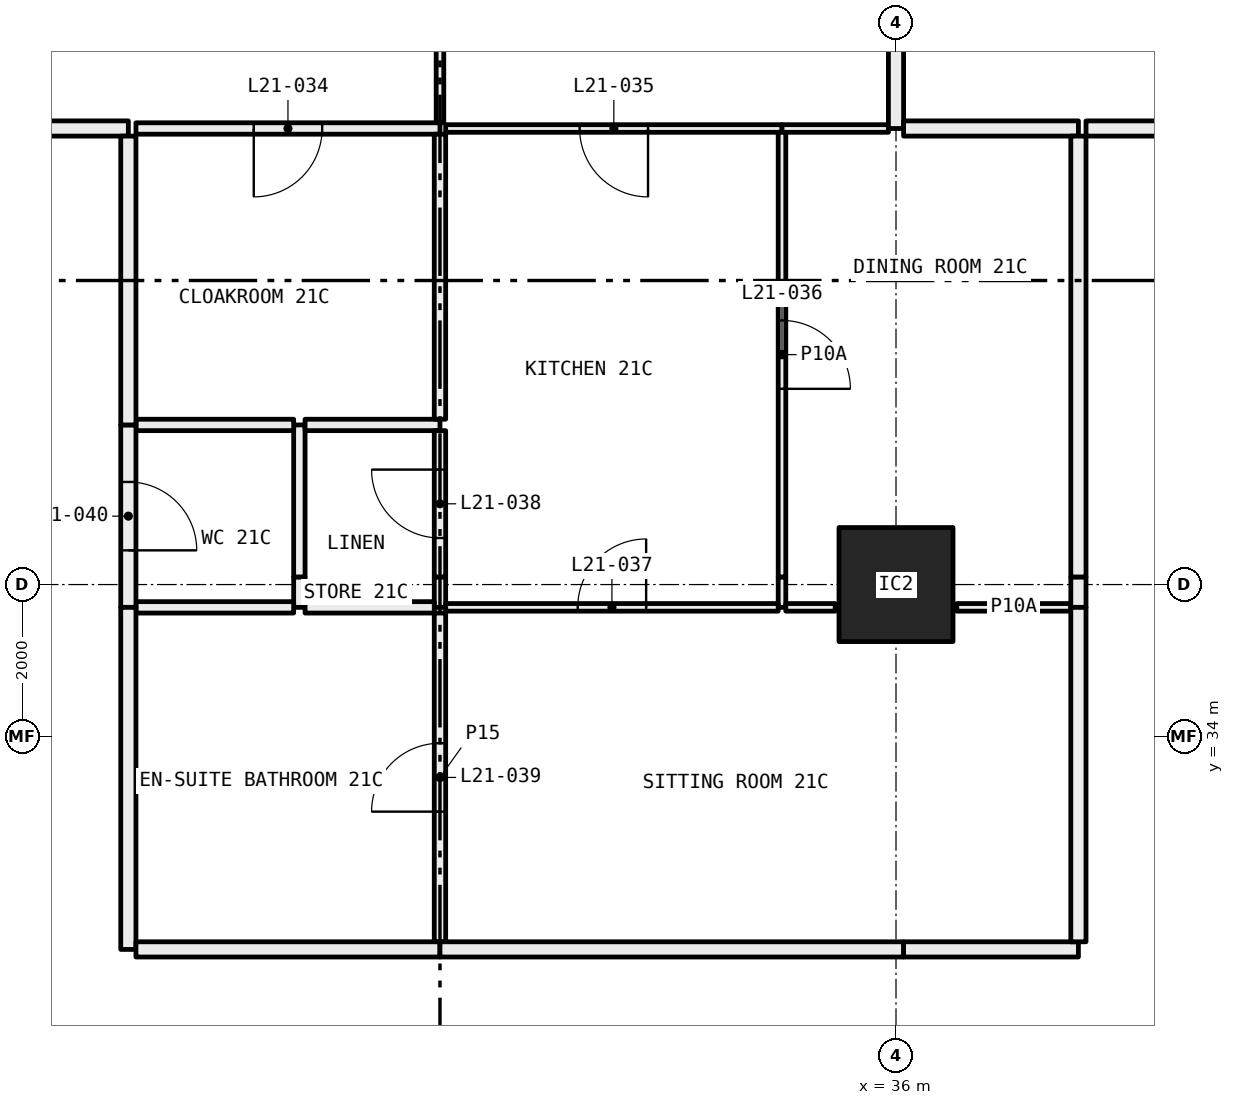
"""IFC4 building model, lengths in metres.
Left out: names, types, materials, properties, quantities, classifications, styles, units other than length and angle.
Written with IfcOpenShell. Run it as: python <this file> out.ifc"""

import sys

from ifc_helpers import new_model, si_unit, direction, frame, frame_2d, origin, origin_2d, place, context, subcontext, project, spatial, rectangle, hollow_rectangle, extrude, element, fill, save


model = new_model("IFC4")
c1 = context("Model", 3, precision=1e-05, world=origin(), true_north=direction((0.0, 1.0)))
c2 = subcontext(c1, "Body", "Model", "MODEL_VIEW")
j1 = project(units=[si_unit("LENGTHUNIT", "METRE"), si_unit("PLANEANGLEUNIT", "RADIAN")], contexts=[c1])
p1 = place(None, origin())
s1 = spatial("IfcSite", under=j1, at=p1, CompositionType="ELEMENT")
p2 = place(p1, origin())
s2 = spatial("IfcBuilding", under=s1, at=p2, CompositionType="ELEMENT")
p3 = place(p2, frame((0.0, 0.0, 85.2)))
s3 = spatial("IfcBuildingStorey", under=s2, at=p3, CompositionType="ELEMENT", Elevation=85.2)
p4 = place(p3, frame((36.0, 36.0, 0.0), z_axis=(0.0, 0.0, 1.0), x_axis=(1.0, 0.0, 0.0)))
e1 = element("IfcColumn", 1, at=p4, inside=s3, PredefinedType="COLUMN", context=c2, shape_type="SweptSolid", body=[
    extrude(hollow_rectangle(XDim=1.5, YDim=1.5, WallThickness=0.065, at=origin_2d()), origin(), (0.0, 0.0, 1.0), 3.05),
])
p5 = place(p3, frame((30.0, 42.075, 0.0), z_axis=(0.0, 0.0, 1.0), x_axis=(0.0, 1.0, 0.0)))
e2 = element("IfcWall", 2, at=p5, inside=s3, PredefinedType="PARTITIONING", context=c2, shape_type="SweptSolid", body=[
    extrude(rectangle(XDim=5.205, YDim=0.1, at=frame_2d((2.603, 0.0))), origin(), (0.0, 0.0, 1.0), 3.05),
])
p6 = place(p5, frame((2.153, 0.0, 0.0)))
e3 = element("IfcOpeningElement", 3, at=p6, cuts=e2, PredefinedType="OPENING", context=c2, shape_type="SweptSolid", body=[
    extrude(rectangle(XDim=0.9, YDim=2.1, at=frame_2d((0.45, 1.05))), frame((0.0, 0.06, 0.0), z_axis=(0.0, -1.0, 0.0), x_axis=(1.0, 0.0, 0.0)), (0.0, 0.0, 1.0), 0.12),
])
p7 = place(p3, frame((26.0, 42.0, 0.0), z_axis=(0.0, 0.0, 1.0), x_axis=(1.0, 0.0, 0.0)))
e4 = element("IfcWall", 4, at=p7, inside=s3, PredefinedType="PARTITIONING", context=c2, shape_type="SweptSolid", body=[
    extrude(rectangle(XDim=4.0, YDim=0.15, at=frame_2d((2.0, 0.0))), origin(), (0.0, 0.0, 1.0), 3.05),
])
p8 = place(p7, frame((1.55, 0.0, 0.0)))
e5 = element("IfcOpeningElement", 5, at=p8, cuts=e4, PredefinedType="OPENING", context=c2, shape_type="SweptSolid", body=[
    extrude(rectangle(XDim=0.9, YDim=2.1, at=frame_2d((0.45, 1.05))), frame((0.0, 0.085, 0.0), z_axis=(0.0, -1.0, 0.0), x_axis=(1.0, 0.0, 0.0)), (0.0, 0.0, 1.0), 0.17),
])
p9 = place(p3, frame((24.0, 42.0, 0.0), z_axis=(0.0, 0.0, 1.0), x_axis=(1.0, 0.0, 0.0)))
e6 = element("IfcWall", 6, at=p9, inside=s3, PredefinedType="PARTITIONING", context=c2, shape_type="SweptSolid", body=[
    extrude(rectangle(XDim=1.9, YDim=0.2, at=frame_2d((0.95, 0.0))), origin(), (0.0, 0.0, 1.0), 3.05),
])
p10 = place(p3, frame((30.075, 42.0, 0.0), z_axis=(0.0, 0.0, 1.0), x_axis=(1.0, 0.0, 0.0)))
e7 = element("IfcWall", 7, at=p10, inside=s3, PredefinedType="PARTITIONING", context=c2, shape_type="SweptSolid", body=[
    extrude(rectangle(XDim=4.425, YDim=0.1, at=frame_2d((2.212, 0.0))), origin(), (0.0, 0.0, 1.0), 3.05),
])
p11 = place(p10, frame((1.762, 0.0, 0.0)))
e8 = element("IfcOpeningElement", 8, at=p11, cuts=e7, PredefinedType="OPENING", context=c2, shape_type="SweptSolid", body=[
    extrude(rectangle(XDim=0.9, YDim=2.1, at=frame_2d((0.45, 1.05))), frame((0.0, 0.06, 0.0), z_axis=(0.0, -1.0, 0.0), x_axis=(1.0, 0.0, 0.0)), (0.0, 0.0, 1.0), 0.12),
])
p12 = place(p3, frame((34.5, 42.0, 0.0), z_axis=(0.0, 0.0, 1.0), x_axis=(1.0, 0.0, 0.0)))
e9 = element("IfcWall", 9, at=p12, inside=s3, PredefinedType="PARTITIONING", context=c2, shape_type="SweptSolid", body=[
    extrude(rectangle(XDim=1.4, YDim=0.1, at=frame_2d((0.7, 0.0))), origin(), (0.0, 0.0, 1.0), 3.05),
])
p13 = place(p3, frame((36.0, 42.0, 0.0), z_axis=(0.0, 0.0, 1.0), x_axis=(0.0, 1.0, 0.0)))
e10 = element("IfcWall", 10, at=p13, inside=s3, PredefinedType="PARTITIONING", context=c2, shape_type="SweptSolid", body=[
    extrude(rectangle(XDim=3.0, YDim=0.2, at=frame_2d((1.5, 0.0))), origin(), (0.0, 0.0, 1.0), 2.45),
])
p14 = place(p3, frame((28.15, 35.7, 0.0), z_axis=(0.0, 0.0, 1.0), x_axis=(0.0, 1.0, 0.0)))
e11 = element("IfcWall", 11, at=p14, inside=s3, PredefinedType="PARTITIONING", context=c2, shape_type="SweptSolid", body=[
    extrude(rectangle(XDim=0.4, YDim=0.15, at=frame_2d((0.2, 0.0))), origin(), (0.0, 0.0, 1.0), 2.45),
])
p15 = place(p3, frame((28.15, 36.1, 0.0), z_axis=(0.0, 0.0, 1.0), x_axis=(0.0, 1.0, 0.0)))
e12 = element("IfcWall", 12, at=p15, inside=s3, PredefinedType="PARTITIONING", context=c2, shape_type="SweptSolid", body=[
    extrude(rectangle(XDim=2.0, YDim=0.15, at=frame_2d((1.0, 0.0))), origin(), (0.0, 0.0, 1.0), 3.05),
])
for number, where, z_axis, x_axis in (
    (13, (28.075, 38.1, 0.0), (0.0, 0.0, 1.0), (-1.0, 0.0, 0.0)),
    (14, (26.0, 35.7, 0.0), (0.0, 0.0, 1.0), (1.0, 0.0, 0.0)),
):
    element("IfcWall", number, at=place(p3, frame(where, z_axis=z_axis, x_axis=x_axis)), inside=s3, PredefinedType="PARTITIONING", context=c2, shape_type="SweptSolid", body=[
        extrude(rectangle(XDim=2.075, YDim=0.15, at=frame_2d((1.038, 0.0))), origin(), (0.0, 0.0, 1.0), 3.05),
    ])
p16 = place(p3, frame((25.9, 38.1, 0.0), z_axis=(0.0, 0.0, 1.0), x_axis=(0.0, -1.0, 0.0)))
e15 = element("IfcWall", 15, at=p16, inside=s3, PredefinedType="PARTITIONING", context=c2, shape_type="SweptSolid", body=[
    extrude(rectangle(XDim=2.4, YDim=0.2, at=frame_2d((1.2, 0.0))), origin(), (0.0, 0.0, 1.0), 2.45),
])
p17 = place(p16, frame((0.75, 0.0, 0.0)))
e16 = element("IfcOpeningElement", 16, at=p17, cuts=e15, PredefinedType="OPENING", context=c2, shape_type="SweptSolid", body=[
    extrude(rectangle(XDim=0.9, YDim=2.1, at=frame_2d((0.45, 1.05))), frame((0.0, 0.11, 0.0), z_axis=(0.0, -1.0, 0.0), x_axis=(1.0, 0.0, 0.0)), (0.0, 0.0, 1.0), 0.22),
])
p18 = place(p3, frame((30.0, 38.1, 0.0), z_axis=(0.0, 0.0, 1.0), x_axis=(-1.0, 0.0, 0.0)))
e17 = element("IfcWall", 17, at=p18, inside=s3, PredefinedType="PARTITIONING", context=c2, shape_type="SweptSolid", body=[
    extrude(rectangle(XDim=1.775, YDim=0.15, at=frame_2d((0.887, 0.0))), origin(), (0.0, 0.0, 1.0), 3.05),
])
p19 = place(p3, frame((30.0, 35.7, 0.0), z_axis=(0.0, 0.0, 1.0), x_axis=(0.0, 1.0, 0.0)))
e18 = element("IfcWall", 18, at=p19, inside=s3, PredefinedType="PARTITIONING", context=c2, shape_type="SweptSolid", body=[
    extrude(rectangle(XDim=0.4, YDim=0.15, at=frame_2d((0.2, 0.0))), origin(), (0.0, 0.0, 1.0), 2.45),
])
p20 = place(p3, frame((30.0, 36.1, 0.0), z_axis=(0.0, 0.0, 1.0), x_axis=(0.0, 1.0, 0.0)))
e19 = element("IfcWall", 19, at=p20, inside=s3, PredefinedType="PARTITIONING", context=c2, shape_type="SweptSolid", body=[
    extrude(rectangle(XDim=1.925, YDim=0.15, at=frame_2d((0.962, 0.0))), origin(), (0.0, 0.0, 1.0), 3.05),
])
p21 = place(p20, frame((0.512, 0.0, 0.0)))
e20 = element("IfcOpeningElement", 20, at=p21, cuts=e19, PredefinedType="OPENING", context=c2, shape_type="SweptSolid", body=[
    extrude(rectangle(XDim=0.9, YDim=2.1, at=frame_2d((0.45, 1.05))), frame((0.0, 0.085, 0.0), z_axis=(0.0, -1.0, 0.0), x_axis=(1.0, 0.0, 0.0)), (0.0, 0.0, 1.0), 0.17),
])
p22 = place(p3, frame((28.225, 35.7, 0.0), z_axis=(0.0, 0.0, 1.0), x_axis=(1.0, 0.0, 0.0)))
e21 = element("IfcWall", 21, at=p22, inside=s3, PredefinedType="PARTITIONING", context=c2, shape_type="SweptSolid", body=[
    extrude(rectangle(XDim=1.7, YDim=0.15, at=frame_2d((0.85, 0.0))), origin(), (0.0, 0.0, 1.0), 3.05),
])
p23 = place(p3, frame((30.0, 38.175, 0.0), z_axis=(0.0, 0.0, 1.0), x_axis=(0.0, 1.0, 0.0)))
e22 = element("IfcWall", 22, at=p23, inside=s3, PredefinedType="PARTITIONING", context=c2, shape_type="SweptSolid", body=[
    extrude(rectangle(XDim=3.75, YDim=0.15, at=frame_2d((1.875, 0.0))), origin(), (0.0, 0.0, 1.0), 3.05),
])
p24 = place(p3, frame((25.9, 41.9, 0.0), z_axis=(0.0, 0.0, 1.0), x_axis=(0.0, -1.0, 0.0)))
e23 = element("IfcWall", 23, at=p24, inside=s3, PredefinedType="PARTITIONING", context=c2, shape_type="SweptSolid", body=[
    extrude(rectangle(XDim=3.8, YDim=0.2, at=frame_2d((1.9, 0.0))), origin(), (0.0, 0.0, 1.0), 3.05),
])
p25 = place(p3, frame((34.5, 35.7, 0.0), z_axis=(0.0, 0.0, 1.0), x_axis=(0.0, 1.0, 0.0)))
e24 = element("IfcWall", 24, at=p25, inside=s3, PredefinedType="PARTITIONING", context=c2, shape_type="SweptSolid", body=[
    extrude(rectangle(XDim=0.4, YDim=0.1, at=frame_2d((0.2, 0.0))), origin(), (0.0, 0.0, 1.0), 2.45),
])
p26 = place(p3, frame((34.5, 36.1, 0.0), z_axis=(0.0, 0.0, 1.0), x_axis=(0.0, 1.0, 0.0)))
e25 = element("IfcWall", 25, at=p26, inside=s3, PredefinedType="PARTITIONING", context=c2, shape_type="SweptSolid", body=[
    extrude(rectangle(XDim=5.85, YDim=0.1, at=frame_2d((2.925, 0.0))), origin(), (0.0, 0.0, 1.0), 3.05),
])
p27 = place(p26, frame((2.475, 0.0, 0.0)))
e26 = element("IfcOpeningElement", 26, at=p27, cuts=e25, PredefinedType="OPENING", context=c2, shape_type="SweptSolid", body=[
    extrude(rectangle(XDim=0.9, YDim=2.1, at=frame_2d((0.45, 1.05))), frame((0.0, 0.06, 0.0), z_axis=(0.0, -1.0, 0.0), x_axis=(1.0, 0.0, 0.0)), (0.0, 0.0, 1.0), 0.12),
])
p28 = place(p3, frame((30.075, 35.7, 0.0), z_axis=(0.0, 0.0, 1.0), x_axis=(1.0, 0.0, 0.0)))
e27 = element("IfcWall", 27, at=p28, inside=s3, PredefinedType="PARTITIONING", context=c2, shape_type="SweptSolid", body=[
    extrude(rectangle(XDim=4.375, YDim=0.1, at=frame_2d((2.188, 0.0))), origin(), (0.0, 0.0, 1.0), 3.05),
])
p29 = place(p28, frame((1.738, 0.0, 0.0)))
e28 = element("IfcOpeningElement", 28, at=p29, cuts=e27, PredefinedType="OPENING", context=c2, shape_type="SweptSolid", body=[
    extrude(rectangle(XDim=0.9, YDim=2.1, at=frame_2d((0.45, 1.05))), frame((0.0, 0.06, 0.0), z_axis=(0.0, -1.0, 0.0), x_axis=(1.0, 0.0, 0.0)), (0.0, 0.0, 1.0), 0.12),
])
p30 = place(p3, frame((34.55, 35.7, 0.0), z_axis=(0.0, 0.0, 1.0), x_axis=(1.0, 0.0, 0.0)))
e29 = element("IfcWall", 29, at=p30, inside=s3, PredefinedType="PARTITIONING", context=c2, shape_type="SweptSolid", body=[
    extrude(rectangle(XDim=0.65, YDim=0.1, at=frame_2d((0.325, 0.0))), origin(), (0.0, 0.0, 1.0), 3.05),
])
p31 = place(p3, frame((36.8, 35.7, 0.0), z_axis=(0.0, 0.0, 1.0), x_axis=(1.0, 0.0, 0.0)))
e30 = element("IfcWall", 30, at=p31, inside=s3, PredefinedType="PARTITIONING", context=c2, shape_type="SweptSolid", body=[
    extrude(rectangle(XDim=1.5, YDim=0.1, at=frame_2d((0.75, 0.0))), origin(), (0.0, 0.0, 1.0), 3.05),
])
p32 = place(p3, frame((38.4, 42.0, 0.0), z_axis=(0.0, 0.0, 1.0), x_axis=(-1.0, 0.0, 0.0)))
e31 = element("IfcWall", 31, at=p32, inside=s3, PredefinedType="PARTITIONING", context=c2, shape_type="SweptSolid", body=[
    extrude(rectangle(XDim=2.3, YDim=0.2, at=frame_2d((1.15, 0.0))), origin(), (0.0, 0.0, 1.0), 3.05),
])
p33 = place(p3, frame((38.4, 35.7, 0.0), z_axis=(0.0, 0.0, 1.0), x_axis=(0.0, 1.0, 0.0)))
e32 = element("IfcWall", 32, at=p33, inside=s3, PredefinedType="PARTITIONING", context=c2, shape_type="SweptSolid", body=[
    extrude(rectangle(XDim=0.4, YDim=0.2, at=frame_2d((0.2, 0.0))), origin(), (0.0, 0.0, 1.0), 2.45),
])
p34 = place(p3, frame((38.4, 36.1, 0.0), z_axis=(0.0, 0.0, 1.0), x_axis=(0.0, 1.0, 0.0)))
e33 = element("IfcWall", 33, at=p34, inside=s3, PredefinedType="PARTITIONING", context=c2, shape_type="SweptSolid", body=[
    extrude(rectangle(XDim=5.8, YDim=0.2, at=frame_2d((2.9, 0.0))), origin(), (0.0, 0.0, 1.0), 3.05),
])
p35 = place(p3, frame((30.0, 31.3, 0.0), z_axis=(0.0, 0.0, 1.0), x_axis=(0.0, 1.0, 0.0)))
e34 = element("IfcWall", 34, at=p35, inside=s3, PredefinedType="PARTITIONING", context=c2, shape_type="SweptSolid", body=[
    extrude(rectangle(XDim=4.325, YDim=0.15, at=frame_2d((2.163, 0.0))), origin(), (0.0, 0.0, 1.0), 3.05),
])
p36 = place(p35, frame((1.712, 0.0, 0.0)))
e35 = element("IfcOpeningElement", 35, at=p36, cuts=e34, PredefinedType="OPENING", context=c2, shape_type="SweptSolid", body=[
    extrude(rectangle(XDim=0.9, YDim=2.1, at=frame_2d((0.45, 1.05))), frame((0.0, 0.085, 0.0), z_axis=(0.0, -1.0, 0.0), x_axis=(1.0, 0.0, 0.0)), (0.0, 0.0, 1.0), 0.17),
])
p37 = place(p3, frame((25.9, 35.7, 0.0), z_axis=(0.0, 0.0, 1.0), x_axis=(0.0, -1.0, 0.0)))
e36 = element("IfcWall", 36, at=p37, inside=s3, PredefinedType="PARTITIONING", context=c2, shape_type="SweptSolid", body=[
    extrude(rectangle(XDim=4.5, YDim=0.2, at=frame_2d((2.25, 0.0))), origin(), (0.0, 0.0, 1.0), 3.05),
])
p38 = place(p3, frame((26.0, 31.2, 0.0), z_axis=(0.0, 0.0, 1.0), x_axis=(1.0, 0.0, 0.0)))
e37 = element("IfcWall", 37, at=p38, inside=s3, PredefinedType="PARTITIONING", context=c2, shape_type="SweptSolid", body=[
    extrude(rectangle(XDim=4.0, YDim=0.2, at=frame_2d((2.0, 0.0))), origin(), (0.0, 0.0, 1.0), 3.05),
])
p39 = place(p3, frame((30.0, 31.2, 0.0), z_axis=(0.0, 0.0, 1.0), x_axis=(1.0, 0.0, 0.0)))
e38 = element("IfcWall", 38, at=p39, inside=s3, PredefinedType="PARTITIONING", context=c2, shape_type="SweptSolid", body=[
    extrude(rectangle(XDim=6.1, YDim=0.2, at=frame_2d((3.05, 0.0))), origin(), (0.0, 0.0, 1.0), 2.45),
])
p40 = place(p3, frame((36.1, 31.2, 0.0), z_axis=(0.0, 0.0, 1.0), x_axis=(1.0, 0.0, 0.0)))
e39 = element("IfcWall", 39, at=p40, inside=s3, PredefinedType="PARTITIONING", context=c2, shape_type="SweptSolid", body=[
    extrude(rectangle(XDim=2.3, YDim=0.2, at=frame_2d((1.15, 0.0))), origin(), (0.0, 0.0, 1.0), 3.05),
])
p41 = place(p3, frame((38.4, 31.3, 0.0), z_axis=(0.0, 0.0, 1.0), x_axis=(0.0, 1.0, 0.0)))
e40 = element("IfcWall", 40, at=p41, inside=s3, PredefinedType="PARTITIONING", context=c2, shape_type="SweptSolid", body=[
    extrude(rectangle(XDim=4.4, YDim=0.2, at=frame_2d((2.2, 0.0))), origin(), (0.0, 0.0, 1.0), 3.05),
])
p42 = place(p3, frame((38.5, 42.0, 0.0), z_axis=(0.0, 0.0, 1.0), x_axis=(1.0, 0.0, 0.0)))
e41 = element("IfcWall", 41, at=p42, inside=s3, PredefinedType="PARTITIONING", context=c2, shape_type="SweptSolid", body=[
    extrude(rectangle(XDim=2.3, YDim=0.2, at=frame_2d((1.15, 0.0))), origin(), (0.0, 0.0, 1.0), 3.05),
])
p43 = place(p8, frame((0.9, 0.0, 0.0), x_axis=(-1.0, 0.0, 0.0)))
e42 = element("IfcDoor", 42, at=p43, inside=s3, OperationType="SINGLE_SWING_LEFT", PredefinedType="DOOR", context=c2, shape_type="SweptSolid", body=[
    extrude(rectangle(XDim=0.9, YDim=2.1, at=frame_2d((0.45, 1.05))), frame((0.0, 0.025, 0.0), z_axis=(0.0, -1.0, 0.0), x_axis=(1.0, 0.0, 0.0)), (0.0, 0.0, 1.0), 0.05),
])
fill(e5, e42)
p44 = place(p11, frame((0.9, 0.0, 0.0), x_axis=(-1.0, 0.0, 0.0)))
e43 = element("IfcDoor", 43, at=p44, inside=s3, OperationType="SINGLE_SWING_RIGHT", PredefinedType="DOOR", context=c2, shape_type="SweptSolid", body=[
    extrude(rectangle(XDim=0.9, YDim=2.1, at=frame_2d((0.45, 1.05))), frame((0.0, 0.025, 0.0), z_axis=(0.0, -1.0, 0.0), x_axis=(1.0, 0.0, 0.0)), (0.0, 0.0, 1.0), 0.05),
])
fill(e8, e43)
p45 = place(p27, frame((0.9, 0.0, 0.0), x_axis=(-1.0, 0.0, 0.0)))
e44 = element("IfcDoor", 44, at=p45, inside=s3, OperationType="SINGLE_SWING_LEFT", PredefinedType="DOOR", context=c2, shape_type="SweptSolid", body=[
    extrude(rectangle(XDim=0.9, YDim=2.1, at=frame_2d((0.45, 1.05))), frame((0.0, 0.025, 0.0), z_axis=(0.0, -1.0, 0.0), x_axis=(1.0, 0.0, 0.0)), (0.0, 0.0, 1.0), 0.05),
])
fill(e26, e44)
p46 = place(p29, origin())
e45 = element("IfcDoor", 45, at=p46, inside=s3, OperationType="SINGLE_SWING_LEFT", PredefinedType="DOOR", context=c2, shape_type="SweptSolid", body=[
    extrude(rectangle(XDim=0.9, YDim=2.1, at=frame_2d((0.45, 1.05))), frame((0.0, 0.025, 0.0), z_axis=(0.0, -1.0, 0.0), x_axis=(1.0, 0.0, 0.0)), (0.0, 0.0, 1.0), 0.05),
])
fill(e28, e45)
p47 = place(p21, origin())
e46 = element("IfcDoor", 46, at=p47, inside=s3, OperationType="SINGLE_SWING_LEFT", PredefinedType="DOOR", context=c2, shape_type="SweptSolid", body=[
    extrude(rectangle(XDim=0.9, YDim=2.1, at=frame_2d((0.45, 1.05))), frame((0.0, 0.025, 0.0), z_axis=(0.0, -1.0, 0.0), x_axis=(1.0, 0.0, 0.0)), (0.0, 0.0, 1.0), 0.05),
])
fill(e20, e46)
p48 = place(p36, origin())
e47 = element("IfcDoor", 47, at=p48, inside=s3, OperationType="SINGLE_SWING_RIGHT", PredefinedType="DOOR", context=c2, shape_type="SweptSolid", body=[
    extrude(rectangle(XDim=0.9, YDim=2.1, at=frame_2d((0.45, 1.05))), frame((0.0, 0.025, 0.0), z_axis=(0.0, -1.0, 0.0), x_axis=(1.0, 0.0, 0.0)), (0.0, 0.0, 1.0), 0.05),
])
fill(e35, e47)
p49 = place(p17, origin())
e48 = element("IfcDoor", 48, at=p49, inside=s3, OperationType="SINGLE_SWING_LEFT", PredefinedType="DOOR", context=c2, shape_type="SweptSolid", body=[
    extrude(rectangle(XDim=0.9, YDim=2.1, at=frame_2d((0.45, 1.05))), frame((0.0, 0.025, 0.0), z_axis=(0.0, -1.0, 0.0), x_axis=(1.0, 0.0, 0.0)), (0.0, 0.0, 1.0), 0.05),
])
fill(e16, e48)
save(model, sys.argv[1])
